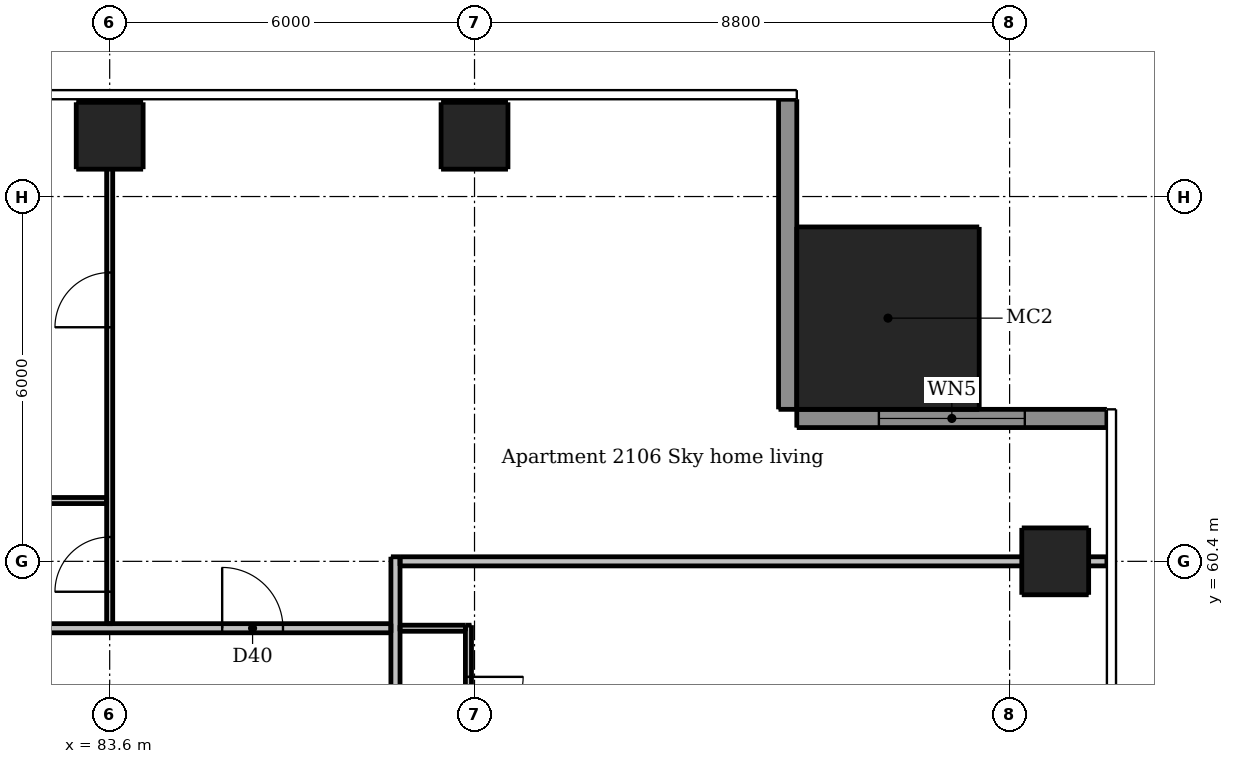
"""IFC4 building model, lengths in metres.
Left out: names, types, materials, properties, quantities, classifications, styles, units other than length and angle.
Written with IfcOpenShell. Run it as: python <this file> out.ifc"""

import sys

from ifc_helpers import new_model, si_unit, direction, frame, frame_2d, origin, origin_2d, place, context, subcontext, project, spatial, rectangle, extrude, element, fill, save


model = new_model("IFC4")
c1 = context("Model", 3, precision=1e-05, world=origin(), true_north=direction((0.0, 1.0)))
c2 = subcontext(c1, "Body", "Model", "MODEL_VIEW")
j1 = project(units=[si_unit("LENGTHUNIT", "METRE"), si_unit("PLANEANGLEUNIT", "RADIAN")], contexts=[c1])
p1 = place(None, origin())
s1 = spatial("IfcSite", under=j1, at=p1, CompositionType="ELEMENT")
p2 = place(p1, origin())
s2 = spatial("IfcBuilding", under=s1, at=p2, CompositionType="ELEMENT")
p3 = place(p2, frame((0.0, 0.0, 82.0)))
s3 = spatial("IfcBuildingStorey", under=s2, at=p3, CompositionType="ELEMENT", Elevation=82.0)
for number, where, z_axis, x_axis in (
    (1, (99.15, 60.4, 0.0), (0.0, 0.0, 1.0), (1.0, 0.0, 0.0)),
    (2, (83.6, 67.4, 0.0), (0.0, 0.0, 1.0), (1.0, 0.0, 0.0)),
    (3, (89.6, 67.4, 0.0), (0.0, 0.0, 1.0), (1.0, 0.0, 0.0)),
):
    element("IfcColumn", number, at=place(p3, frame(where, z_axis=z_axis, x_axis=x_axis)), inside=s3, PredefinedType="COLUMN", context=c2, shape_type="SweptSolid", body=[
        extrude(rectangle(XDim=1.1, YDim=1.1, at=origin_2d()), origin(), (0.0, 0.0, 1.0), 3.05),
    ])
p4 = place(p3, frame((96.4, 64.4, 0.0), z_axis=(0.0, 0.0, 1.0), x_axis=(1.0, 0.0, 0.0)))
e4 = element("IfcColumn", 4, at=p4, inside=s3, PredefinedType="COLUMN", context=c2, shape_type="SweptSolid", body=[
    extrude(rectangle(XDim=3.0, YDim=3.0, at=origin_2d()), origin(), (0.0, 0.0, 1.0), 3.3),
])
p5 = place(p3, frame((100.0, 62.75, 0.0), z_axis=(0.0, 0.0, 1.0), x_axis=(-1.0, 0.0, 0.0)))
e5 = element("IfcWall", 5, at=p5, inside=s3, PredefinedType="SOLIDWALL", context=c2, shape_type="SweptSolid", body=[
    extrude(rectangle(XDim=5.1, YDim=0.3, at=frame_2d((2.55, 0.0))), origin(), (0.0, 0.0, 1.0), 3.05),
])
p6 = place(p5, frame((1.35, 0.0, 0.15)))
e6 = element("IfcOpeningElement", 6, at=p6, cuts=e5, PredefinedType="OPENING", context=c2, shape_type="SweptSolid", body=[
    extrude(rectangle(XDim=2.4, YDim=2.1, at=frame_2d((1.2, 1.05))), frame((0.0, 0.16, 0.0), z_axis=(0.0, -1.0, 0.0), x_axis=(1.0, 0.0, 0.0)), (0.0, 0.0, 1.0), 0.32),
])
p7 = place(p3, frame((94.75, 62.9, 0.0), z_axis=(0.0, 0.0, 1.0), x_axis=(0.0, 1.0, 0.0)))
e7 = element("IfcWall", 7, at=p7, inside=s3, PredefinedType="SOLIDWALL", context=c2, shape_type="SweptSolid", body=[
    extrude(rectangle(XDim=5.1, YDim=0.3, at=frame_2d((2.55, 0.0))), origin(), (0.0, 0.0, 1.0), 3.05),
])
p8 = place(p3, frame((83.6, 59.375, 0.0), z_axis=(0.0, 0.0, 1.0), x_axis=(0.0, 1.0, 0.0)))
e8 = element("IfcWall", 8, at=p8, inside=s3, PredefinedType="PARTITIONING", context=c2, shape_type="SweptSolid", body=[
    extrude(rectangle(XDim=8.625, YDim=0.1, at=frame_2d((4.312, 0.0))), origin(), (0.0, 0.0, 1.0), 2.516),
])
p9 = place(p8, frame((0.525, 0.0, 0.0)))
e9 = element("IfcOpeningElement", 9, at=p9, cuts=e8, PredefinedType="OPENING", context=c2, shape_type="SweptSolid", body=[
    extrude(rectangle(XDim=0.9, YDim=2.1, at=frame_2d((0.45, 1.05))), frame((0.0, 0.06, 0.0), z_axis=(0.0, -1.0, 0.0), x_axis=(1.0, 0.0, 0.0)), (0.0, 0.0, 1.0), 0.12),
])
p10 = place(p8, frame((4.875, 0.0, 0.0)))
e10 = element("IfcOpeningElement", 10, at=p10, cuts=e8, PredefinedType="OPENING", context=c2, shape_type="SweptSolid", body=[
    extrude(rectangle(XDim=0.9, YDim=2.1, at=frame_2d((0.45, 1.05))), frame((0.0, 0.06, 0.0), z_axis=(0.0, -1.0, 0.0), x_axis=(1.0, 0.0, 0.0)), (0.0, 0.0, 1.0), 0.12),
])
p11 = place(p3, frame((89.5, 59.35, 0.0), z_axis=(0.0, 0.0, 1.0), x_axis=(0.0, -1.0, 0.0)))
e11 = element("IfcWall", 11, at=p11, inside=s3, PredefinedType="PARTITIONING", context=c2, shape_type="SweptSolid", body=[
    extrude(rectangle(XDim=19.775, YDim=0.1, at=frame_2d((9.888, 0.0))), origin(), (0.0, 0.0, 1.0), 2.51),
])
p12 = place(p11, frame((14.95, 0.0, 0.0)))
e12 = element("IfcOpeningElement", 12, at=p12, cuts=e11, PredefinedType="OPENING", context=c2, shape_type="SweptSolid", body=[
    extrude(rectangle(XDim=0.9, YDim=2.1, at=frame_2d((0.45, 1.05))), frame((0.0, 0.06, 0.0), z_axis=(0.0, -1.0, 0.0), x_axis=(1.0, 0.0, 0.0)), (0.0, 0.0, 1.0), 0.12),
])
p13 = place(p11, frame((9.0, 0.0, 0.0)))
e13 = element("IfcOpeningElement", 13, at=p13, cuts=e11, PredefinedType="OPENING", context=c2, shape_type="SweptSolid", body=[
    extrude(rectangle(XDim=0.9, YDim=2.1, at=frame_2d((0.45, 1.05))), frame((0.0, 0.06, 0.0), z_axis=(0.0, -1.0, 0.0), x_axis=(1.0, 0.0, 0.0)), (0.0, 0.0, 1.0), 0.12),
])
p14 = place(p11, frame((11.4, 0.0, 0.0)))
e14 = element("IfcOpeningElement", 14, at=p14, cuts=e11, PredefinedType="OPENING", context=c2, shape_type="SweptSolid", body=[
    extrude(rectangle(XDim=0.9, YDim=2.1, at=frame_2d((0.45, 1.05))), frame((0.0, 0.06, 0.0), z_axis=(0.0, -1.0, 0.0), x_axis=(1.0, 0.0, 0.0)), (0.0, 0.0, 1.0), 0.12),
])
p15 = place(p11, frame((18.5, 0.0, 0.0)))
e15 = element("IfcOpeningElement", 15, at=p15, cuts=e11, PredefinedType="OPENING", context=c2, shape_type="SweptSolid", body=[
    extrude(rectangle(XDim=0.9, YDim=2.1, at=frame_2d((0.45, 1.05))), frame((0.0, 0.06, 0.0), z_axis=(0.0, -1.0, 0.0), x_axis=(1.0, 0.0, 0.0)), (0.0, 0.0, 1.0), 0.12),
])
p16 = place(p11, frame((6.0, 0.0, 0.0)))
e16 = element("IfcOpeningElement", 16, at=p16, cuts=e11, PredefinedType="OPENING", context=c2, shape_type="SweptSolid", body=[
    extrude(rectangle(XDim=0.9, YDim=2.1, at=frame_2d((0.45, 1.05))), frame((0.0, 0.06, 0.0), z_axis=(0.0, -1.0, 0.0), x_axis=(1.0, 0.0, 0.0)), (0.0, 0.0, 1.0), 0.12),
])
p17 = place(p11, frame((0.85, 0.0, 0.0)))
e17 = element("IfcOpeningElement", 17, at=p17, cuts=e11, PredefinedType="OPENING", context=c2, shape_type="SweptSolid", body=[
    extrude(rectangle(XDim=0.9, YDim=2.1, at=frame_2d((0.45, 1.05))), frame((0.0, 0.06, 0.0), z_axis=(0.0, -1.0, 0.0), x_axis=(1.0, 0.0, 0.0)), (0.0, 0.0, 1.0), 0.12),
])
p18 = place(p11, frame((3.35, 0.0, 0.0)))
e18 = element("IfcOpeningElement", 18, at=p18, cuts=e11, PredefinedType="OPENING", context=c2, shape_type="SweptSolid", body=[
    extrude(rectangle(XDim=0.8, YDim=2.1, at=frame_2d((0.4, 1.05))), frame((0.0, 0.06, 0.0), z_axis=(0.0, -1.0, 0.0), x_axis=(1.0, 0.0, 0.0)), (0.0, 0.0, 1.0), 0.12),
])
p19 = place(p3, frame((83.55, 61.4, 0.0), z_axis=(0.0, 0.0, 1.0), x_axis=(-1.0, 0.0, 0.0)))
e19 = element("IfcWall", 19, at=p19, inside=s3, PredefinedType="PARTITIONING", context=c2, shape_type="SweptSolid", body=[
    extrude(rectangle(XDim=5.875, YDim=0.1, at=frame_2d((2.938, 0.0))), origin(), (0.0, 0.0, 1.0), 3.05),
])
p20 = place(p19, frame((3.75, 0.0, 0.0)))
e20 = element("IfcOpeningElement", 20, at=p20, cuts=e19, PredefinedType="OPENING", context=c2, shape_type="SweptSolid", body=[
    extrude(rectangle(XDim=0.8, YDim=2.1, at=frame_2d((0.4, 1.05))), frame((0.0, 0.06, 0.0), z_axis=(0.0, -1.0, 0.0), x_axis=(1.0, 0.0, 0.0)), (0.0, 0.0, 1.0), 0.12),
])
p21 = place(p3, frame((88.375, 59.3, 0.0), z_axis=(0.0, 0.0, 1.0), x_axis=(1.0, 0.0, 0.0)))
e21 = element("IfcWall", 21, at=p21, inside=s3, PredefinedType="PARTITIONING", context=c2, shape_type="SweptSolid", body=[
    extrude(rectangle(XDim=1.075, YDim=0.1, at=frame_2d((0.538, 0.0))), origin(), (0.0, 0.0, 1.0), 3.05),
])
p22 = place(p3, frame((88.3, 60.475, 0.0), z_axis=(0.0, 0.0, 1.0), x_axis=(0.0, -1.0, 0.0)))
e22 = element("IfcWall", 22, at=p22, inside=s3, PredefinedType="PARTITIONING", context=c2, shape_type="SweptSolid", body=[
    extrude(rectangle(XDim=28.7, YDim=0.15, at=frame_2d((14.35, 0.0))), origin(), (0.0, 0.0, 1.0), 3.05),
])
p23 = place(p22, frame((27.425, 0.0, 0.0)))
e23 = element("IfcOpeningElement", 23, at=p23, cuts=e22, PredefinedType="OPENING", context=c2, shape_type="SweptSolid", body=[
    extrude(rectangle(XDim=1.0, YDim=2.1, at=frame_2d((0.5, 1.05))), frame((0.0, 0.085, 0.0), z_axis=(0.0, -1.0, 0.0), x_axis=(1.0, 0.0, 0.0)), (0.0, 0.0, 1.0), 0.17),
])
p24 = place(p22, frame((10.575, 0.0, 0.0)))
e24 = element("IfcOpeningElement", 24, at=p24, cuts=e22, PredefinedType="OPENING", context=c2, shape_type="SweptSolid", body=[
    extrude(rectangle(XDim=1.0, YDim=2.1, at=frame_2d((0.5, 1.05))), frame((0.0, 0.085, 0.0), z_axis=(0.0, -1.0, 0.0), x_axis=(1.0, 0.0, 0.0)), (0.0, 0.0, 1.0), 0.17),
])
p25 = place(p3, frame((88.375, 60.4, 0.0), z_axis=(0.0, 0.0, 1.0), x_axis=(1.0, 0.0, 0.0)))
e25 = element("IfcWall", 25, at=p25, inside=s3, PredefinedType="PARTITIONING", context=c2, shape_type="SweptSolid", body=[
    extrude(rectangle(XDim=11.625, YDim=0.15, at=frame_2d((5.812, 0.0))), origin(), (0.0, 0.0, 1.0), 2.516),
])
p26 = place(p3, frame((59.675, 59.3, 0.0), z_axis=(0.0, 0.0, 1.0), x_axis=(1.0, 0.0, 0.0)))
e26 = element("IfcWall", 26, at=p26, inside=s3, PredefinedType="PARTITIONING", context=c2, shape_type="SweptSolid", body=[
    extrude(rectangle(XDim=28.55, YDim=0.15, at=frame_2d((14.275, 0.0))), origin(), (0.0, 0.0, 1.0), 3.05),
])
p27 = place(p26, frame((8.975, 0.0, 0.0)))
e27 = element("IfcOpeningElement", 27, at=p27, cuts=e26, PredefinedType="OPENING", context=c2, shape_type="SweptSolid", body=[
    extrude(rectangle(XDim=1.0, YDim=2.1, at=frame_2d((0.5, 1.05))), frame((0.0, 0.085, 0.0), z_axis=(0.0, -1.0, 0.0), x_axis=(1.0, 0.0, 0.0)), (0.0, 0.0, 1.0), 0.17),
])
p28 = place(p26, frame((25.775, 0.0, 0.0)))
e28 = element("IfcOpeningElement", 28, at=p28, cuts=e26, PredefinedType="OPENING", context=c2, shape_type="SweptSolid", body=[
    extrude(rectangle(XDim=1.0, YDim=2.1, at=frame_2d((0.5, 1.05))), frame((0.0, 0.085, 0.0), z_axis=(0.0, -1.0, 0.0), x_axis=(1.0, 0.0, 0.0)), (0.0, 0.0, 1.0), 0.17),
])
p29 = place(p6, origin())
e29 = element("IfcWindow", 29, at=p29, inside=s3, PartitioningType="DOUBLE_PANEL_VERTICAL", PredefinedType="WINDOW", context=c2, shape_type="SweptSolid", body=[
    extrude(rectangle(XDim=2.4, YDim=2.1, at=frame_2d((1.2, 1.05))), frame((0.0, 0.03, 0.0), z_axis=(0.0, -1.0, 0.0), x_axis=(1.0, 0.0, 0.0)), (0.0, 0.0, 1.0), 0.06),
])
fill(e6, e29)
p30 = place(p17, origin())
e30 = element("IfcDoor", 30, at=p30, inside=s3, OperationType="SINGLE_SWING_LEFT", PredefinedType="DOOR", context=c2, shape_type="SweptSolid", body=[
    extrude(rectangle(XDim=0.9, YDim=2.1, at=frame_2d((0.45, 1.05))), frame((0.0, 0.025, 0.0), z_axis=(0.0, -1.0, 0.0), x_axis=(1.0, 0.0, 0.0)), (0.0, 0.0, 1.0), 0.05),
])
fill(e17, e30)
p31 = place(p28, origin())
e31 = element("IfcDoor", 31, at=p31, inside=s3, OperationType="SINGLE_SWING_LEFT", PredefinedType="DOOR", context=c2, shape_type="SweptSolid", body=[
    extrude(rectangle(XDim=1.0, YDim=2.1, at=frame_2d((0.5, 1.05))), frame((0.0, 0.025, 0.0), z_axis=(0.0, -1.0, 0.0), x_axis=(1.0, 0.0, 0.0)), (0.0, 0.0, 1.0), 0.05),
])
fill(e28, e31)
p32 = place(p9, origin())
e32 = element("IfcDoor", 32, at=p32, inside=s3, OperationType="SINGLE_SWING_LEFT", PredefinedType="DOOR", context=c2, shape_type="SweptSolid", body=[
    extrude(rectangle(XDim=0.9, YDim=2.1, at=frame_2d((0.45, 1.05))), frame((0.0, 0.025, 0.0), z_axis=(0.0, -1.0, 0.0), x_axis=(1.0, 0.0, 0.0)), (0.0, 0.0, 1.0), 0.05),
])
fill(e9, e32)
p33 = place(p10, origin())
e33 = element("IfcDoor", 33, at=p33, inside=s3, OperationType="SINGLE_SWING_LEFT", PredefinedType="DOOR", context=c2, shape_type="SweptSolid", body=[
    extrude(rectangle(XDim=0.9, YDim=2.1, at=frame_2d((0.45, 1.05))), frame((0.0, 0.025, 0.0), z_axis=(0.0, -1.0, 0.0), x_axis=(1.0, 0.0, 0.0)), (0.0, 0.0, 1.0), 0.05),
])
fill(e10, e33)
save(model, sys.argv[1])
